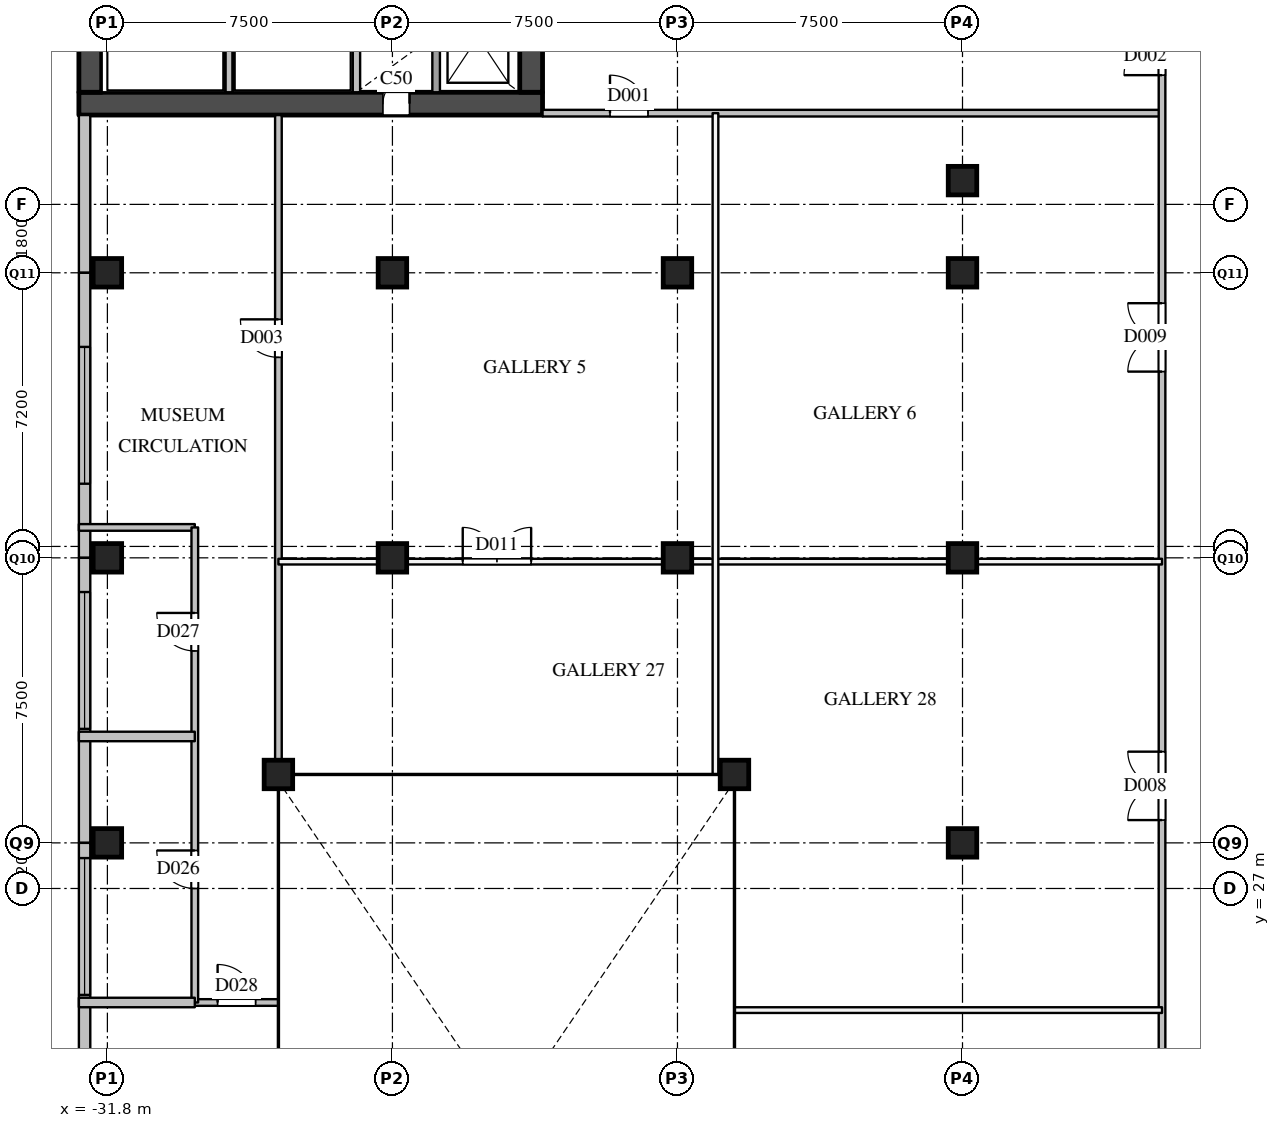
"""IFC4 building model, lengths in metres.
Left out: names, types, materials, properties, quantities, classifications, styles, units other than length and angle.
Written with IfcOpenShell. Run it as: python <this file> out.ifc"""

import sys

from ifc_helpers import new_model, si_unit, direction, frame, frame_2d, origin, origin_2d, place, context, subcontext, project, spatial, rectangle, extrude, element, fill, save


model = new_model("IFC4")
c1 = context("Model", 3, precision=1e-05, world=origin(), true_north=direction((0.0, 1.0)))
c2 = subcontext(c1, "Body", "Model", "MODEL_VIEW")
j1 = project(units=[si_unit("LENGTHUNIT", "METRE"), si_unit("PLANEANGLEUNIT", "RADIAN")], contexts=[c1])
p1 = place(None, origin())
s1 = spatial("IfcSite", under=j1, at=p1, CompositionType="ELEMENT")
p2 = place(p1, origin())
s2 = spatial("IfcBuilding", under=s1, at=p2, CompositionType="ELEMENT")
p3 = place(p2, frame((0.0, 0.0, 21.0)))
s3 = spatial("IfcBuildingStorey", under=s2, at=p3, CompositionType="ELEMENT", Elevation=21.0)
for number, where, z_axis, x_axis in (
    (1, (-31.8, 28.2, 0.0), (0.0, 0.0, 1.0), (1.0, 0.0, 0.0)),
    (2, (-31.8, 35.7, 0.0), (0.0, 0.0, 1.0), (1.0, 0.0, 0.0)),
    (3, (-31.8, 43.2, 0.0), (0.0, 0.0, 1.0), (1.0, 0.0, 0.0)),
    (4, (-24.3, 35.7, 0.0), (0.0, 0.0, 1.0), (1.0, 0.0, 0.0)),
    (5, (-24.3, 43.2, 0.0), (0.0, 0.0, 1.0), (1.0, 0.0, 0.0)),
    (6, (-16.8, 35.7, 0.0), (0.0, 0.0, 1.0), (1.0, 0.0, 0.0)),
    (7, (-16.8, 43.2, 0.0), (0.0, 0.0, 1.0), (1.0, 0.0, 0.0)),
    (8, (-9.3, 28.2, 0.0), (0.0, 0.0, 1.0), (1.0, 0.0, 0.0)),
    (9, (-9.3, 35.7, 0.0), (0.0, 0.0, 1.0), (1.0, 0.0, 0.0)),
    (10, (-9.3, 43.2, 0.0), (0.0, 0.0, 1.0), (1.0, 0.0, 0.0)),
    (11, (-15.3, 30.0, 0.0), (0.0, 0.0, 1.0), (1.0, 0.0, 0.0)),
    (12, (-27.3, 30.0, 0.0), (0.0, 0.0, 1.0), (1.0, 0.0, 0.0)),
    (13, (-9.3, 45.625, 0.0), (0.0, 0.0, 1.0), (1.0, 0.0, 0.0)),
):
    element("IfcColumn", number, at=place(p3, frame(where, z_axis=z_axis, x_axis=x_axis)), inside=s3, PredefinedType="COLUMN", context=c2, shape_type="SweptSolid", body=[
        extrude(rectangle(XDim=0.75, YDim=0.75, at=origin_2d()), origin(), (0.0, 0.0, 1.0), 5.0),
    ])
p4 = place(p3, frame((-32.4, 47.35, 0.0), z_axis=(0.0, 0.0, 1.0), x_axis=(0.0, -1.0, 0.0)))
e14 = element("IfcWall", 14, at=p4, inside=s3, PredefinedType="SOLIDWALL", context=c2, shape_type="SweptSolid", body=[
    extrude(rectangle(XDim=4.15, YDim=0.3, at=frame_2d((2.075, 0.0))), origin(), (0.0, 0.0, 1.0), 4.59),
])
p5 = place(p3, frame((-32.4, 43.2, 0.0), z_axis=(0.0, 0.0, 1.0), x_axis=(0.0, -1.0, 0.0)))
e15 = element("IfcWall", 15, at=p5, inside=s3, PredefinedType="SOLIDWALL", context=c2, shape_type="SweptSolid", body=[
    extrude(rectangle(XDim=7.5, YDim=0.3, at=frame_2d((3.75, 0.0))), origin(), (0.0, 0.0, 1.0), 4.59),
])
p6 = place(p5, frame((1.95, 0.0, 2.4)))
e16 = element("IfcOpeningElement", 16, at=p6, cuts=e15, PredefinedType="OPENING", context=c2, shape_type="SweptSolid", body=[
    extrude(rectangle(XDim=3.6, YDim=1.2, at=frame_2d((1.8, 0.6))), frame((0.0, 0.16, 0.0), z_axis=(0.0, -1.0, 0.0), x_axis=(1.0, 0.0, 0.0)), (0.0, 0.0, 1.0), 0.32),
])
p7 = place(p3, frame((-32.4, 35.7, 0.0), z_axis=(0.0, 0.0, 1.0), x_axis=(0.0, -1.0, 0.0)))
e17 = element("IfcWall", 17, at=p7, inside=s3, PredefinedType="SOLIDWALL", context=c2, shape_type="SweptSolid", body=[
    extrude(rectangle(XDim=7.5, YDim=0.3, at=frame_2d((3.75, 0.0))), origin(), (0.0, 0.0, 1.0), 4.59),
])
p8 = place(p7, frame((0.9, 0.0, 2.4)))
e18 = element("IfcOpeningElement", 18, at=p8, cuts=e17, PredefinedType="OPENING", context=c2, shape_type="SweptSolid", body=[
    extrude(rectangle(XDim=3.6, YDim=1.2, at=frame_2d((1.8, 0.6))), frame((0.0, 0.16, 0.0), z_axis=(0.0, -1.0, 0.0), x_axis=(1.0, 0.0, 0.0)), (0.0, 0.0, 1.0), 0.32),
])
p9 = place(p3, frame((-32.4, 28.2, 0.0), z_axis=(0.0, 0.0, 1.0), x_axis=(0.0, -1.0, 0.0)))
e19 = element("IfcWall", 19, at=p9, inside=s3, PredefinedType="SOLIDWALL", context=c2, shape_type="SweptSolid", body=[
    extrude(rectangle(XDim=7.5, YDim=0.3, at=frame_2d((3.75, 0.0))), origin(), (0.0, 0.0, 1.0), 4.59),
])
p10 = place(p9, frame((0.4, 0.0, 2.4)))
e20 = element("IfcOpeningElement", 20, at=p10, cuts=e19, PredefinedType="OPENING", context=c2, shape_type="SweptSolid", body=[
    extrude(rectangle(XDim=3.6, YDim=1.2, at=frame_2d((1.8, 0.6))), frame((0.0, 0.16, 0.0), z_axis=(0.0, -1.0, 0.0), x_axis=(1.0, 0.0, 0.0)), (0.0, 0.0, 1.0), 0.32),
])
p11 = place(p3, frame((-32.55, 47.65, 0.0), z_axis=(0.0, 0.0, 1.0), x_axis=(1.0, 0.0, 0.0)))
e21 = element("IfcWall", 21, at=p11, inside=s3, PredefinedType="SHEAR", context=c2, shape_type="SweptSolid", body=[
    extrude(rectangle(XDim=12.2, YDim=0.6, at=frame_2d((6.1, 0.0))), origin(), (0.0, 0.0, 1.0), 4.55),
])
p12 = place(p11, frame((8.0, 0.0, 0.0)))
e22 = element("IfcOpeningElement", 22, at=p12, cuts=e21, PredefinedType="OPENING", context=c2, shape_type="SweptSolid", body=[
    extrude(rectangle(XDim=0.7, YDim=2.1, at=frame_2d((0.35, 1.05))), frame((0.0, 0.31, 0.0), z_axis=(0.0, -1.0, 0.0), x_axis=(1.0, 0.0, 0.0)), (0.0, 0.0, 1.0), 0.62),
])
p13 = place(p3, frame((-32.25, 47.95, 0.0), z_axis=(0.0, 0.0, 1.0), x_axis=(0.0, 1.0, 0.0)))
e23 = element("IfcWall", 23, at=p13, inside=s3, PredefinedType="SHEAR", context=c2, shape_type="SweptSolid", body=[
    extrude(rectangle(XDim=10.4, YDim=0.6, at=frame_2d((5.2, 0.0))), origin(), (0.0, 0.0, 1.0), 4.55),
])
p14 = place(p3, frame((-20.65, 47.95, 0.0), z_axis=(0.0, 0.0, 1.0), x_axis=(0.0, 1.0, 0.0)))
e24 = element("IfcWall", 24, at=p14, inside=s3, PredefinedType="SHEAR", context=c2, shape_type="SweptSolid", body=[
    extrude(rectangle(XDim=10.4, YDim=0.6, at=frame_2d((5.2, 0.0))), origin(), (0.0, 0.0, 1.0), 4.55),
])
p15 = place(p14, frame((6.7, 0.0, 0.0)))
e25 = element("IfcOpeningElement", 25, at=p15, cuts=e24, PredefinedType="OPENING", context=c2, shape_type="SweptSolid", body=[
    extrude(rectangle(XDim=1.0, YDim=2.1, at=frame_2d((0.5, 1.05))), frame((0.0, 0.31, 0.0), z_axis=(0.0, -1.0, 0.0), x_axis=(1.0, 0.0, 0.0)), (0.0, 0.0, 1.0), 0.62),
])
for number, where, z_axis, x_axis in (
    (26, (-28.6, 47.95, 0.0), (0.0, 0.0, 1.0), (0.0, 1.0, 0.0)),
    (27, (-25.25, 47.95, 0.0), (0.0, 0.0, 1.0), (0.0, 1.0, 0.0)),
):
    element("IfcWall", number, at=place(p3, frame(where, z_axis=z_axis, x_axis=x_axis)), inside=s3, PredefinedType="SOLIDWALL", context=c2, shape_type="SweptSolid", body=[
        extrude(rectangle(XDim=2.08, YDim=0.2, at=frame_2d((1.04, 0.0))), origin(), (0.0, 0.0, 1.0), 4.55),
    ])
p16 = place(p3, frame((-23.15, 47.95, 0.0), z_axis=(0.0, 0.0, 1.0), x_axis=(0.0, 1.0, 0.0)))
e28 = element("IfcWall", 28, at=p16, inside=s3, PredefinedType="SOLIDWALL", context=c2, shape_type="SweptSolid", body=[
    extrude(rectangle(XDim=2.9, YDim=0.2, at=frame_2d((1.45, 0.0))), origin(), (0.0, 0.0, 1.0), 4.55),
])
p17 = place(p3, frame((-29.5, 24.0, 0.0), z_axis=(0.0, 0.0, 1.0), x_axis=(1.0, 0.0, 0.0)))
e29 = element("IfcWall", 29, at=p17, inside=s3, PredefinedType="PARTITIONING", context=c2, shape_type="SweptSolid", body=[
    extrude(rectangle(XDim=2.2, YDim=0.175, at=frame_2d((1.1, 0.0))), origin(), (0.0, 0.0, 1.0), 4.55),
])
p18 = place(p17, frame((0.6, 0.0, 0.0)))
e30 = element("IfcOpeningElement", 30, at=p18, cuts=e29, PredefinedType="OPENING", context=c2, shape_type="SweptSolid", body=[
    extrude(rectangle(XDim=1.0, YDim=2.1, at=frame_2d((0.5, 1.05))), frame((0.0, 0.097, 0.0), z_axis=(0.0, -1.0, 0.0), x_axis=(1.0, 0.0, 0.0)), (0.0, 0.0, 1.0), 0.195),
])
p19 = place(p3, frame((-32.55, 36.5, 0.0), z_axis=(0.0, 0.0, 1.0), x_axis=(1.0, 0.0, 0.0)))
e31 = element("IfcWall", 31, at=p19, inside=s3, PredefinedType="PARTITIONING", context=c2, shape_type="SweptSolid", body=[
    extrude(rectangle(XDim=3.05, YDim=0.175, at=frame_2d((1.525, 0.0))), origin(), (0.0, 0.0, 1.0), 3.79),
])
p20 = place(p3, frame((-20.35, 47.4, 0.0), z_axis=(0.0, 0.0, 1.0), x_axis=(1.0, 0.0, 0.0)))
e32 = element("IfcWall", 32, at=p20, inside=s3, PredefinedType="PARTITIONING", context=c2, shape_type="SweptSolid", body=[
    extrude(rectangle(XDim=16.3, YDim=0.175, at=frame_2d((8.15, 0.0))), origin(), (0.0, 0.0, 1.0), 3.79),
])
p21 = place(p20, frame((1.775, 0.0, 0.0)))
e33 = element("IfcOpeningElement", 33, at=p21, cuts=e32, PredefinedType="OPENING", context=c2, shape_type="SweptSolid", body=[
    extrude(rectangle(XDim=1.0, YDim=2.1, at=frame_2d((0.5, 1.05))), frame((0.0, 0.097, 0.0), z_axis=(0.0, -1.0, 0.0), x_axis=(1.0, 0.0, 0.0)), (0.0, 0.0, 1.0), 0.195),
])
p22 = place(p3, frame((-29.5, 24.0, 0.0), z_axis=(0.0, 0.0, 1.0), x_axis=(0.0, 1.0, 0.0)))
e34 = element("IfcWall", 34, at=p22, inside=s3, PredefinedType="PARTITIONING", context=c2, shape_type="SweptSolid", body=[
    extrude(rectangle(XDim=12.5, YDim=0.175, at=frame_2d((6.25, 0.0))), origin(), (0.0, 0.0, 1.0), 3.79),
])
p23 = place(p22, frame((3.0, 0.0, 0.0)))
e35 = element("IfcOpeningElement", 35, at=p23, cuts=e34, PredefinedType="OPENING", context=c2, shape_type="SweptSolid", body=[
    extrude(rectangle(XDim=1.0, YDim=2.1, at=frame_2d((0.5, 1.05))), frame((0.0, 0.097, 0.0), z_axis=(0.0, -1.0, 0.0), x_axis=(1.0, 0.0, 0.0)), (0.0, 0.0, 1.0), 0.195),
])
p24 = place(p22, frame((9.25, 0.0, 0.0)))
e36 = element("IfcOpeningElement", 36, at=p24, cuts=e34, PredefinedType="OPENING", context=c2, shape_type="SweptSolid", body=[
    extrude(rectangle(XDim=1.0, YDim=2.1, at=frame_2d((0.5, 1.05))), frame((0.0, 0.097, 0.0), z_axis=(0.0, -1.0, 0.0), x_axis=(1.0, 0.0, 0.0)), (0.0, 0.0, 1.0), 0.195),
])
p25 = place(p3, frame((-27.3, 30.0, 0.0), z_axis=(0.0, 0.0, 1.0), x_axis=(0.0, 1.0, 0.0)))
e37 = element("IfcWall", 37, at=p25, inside=s3, PredefinedType="PARTITIONING", context=c2, shape_type="SweptSolid", body=[
    extrude(rectangle(XDim=17.35, YDim=0.175, at=frame_2d((8.675, 0.0))), origin(), (0.0, 0.0, 1.0), 3.79),
])
p26 = place(p25, frame((10.975, 0.0, 0.0)))
e38 = element("IfcOpeningElement", 38, at=p26, cuts=e37, PredefinedType="OPENING", context=c2, shape_type="SweptSolid", body=[
    extrude(rectangle(XDim=1.0, YDim=2.1, at=frame_2d((0.5, 1.05))), frame((0.0, 0.097, 0.0), z_axis=(0.0, -1.0, 0.0), x_axis=(1.0, 0.0, 0.0)), (0.0, 0.0, 1.0), 0.195),
])
p27 = place(p3, frame((-4.05, -4.05, 0.0), z_axis=(0.0, 0.0, 1.0), x_axis=(0.0, 1.0, 0.0)))
e39 = element("IfcWall", 39, at=p27, inside=s3, PredefinedType="PARTITIONING", context=c2, shape_type="SweptSolid", body=[
    extrude(rectangle(XDim=63.0, YDim=0.175, at=frame_2d((31.5, 0.0))), origin(), (0.0, 0.0, 1.0), 3.79),
])
p28 = place(p27, frame((52.45, 0.0, 0.0)))
e40 = element("IfcOpeningElement", 40, at=p28, cuts=e39, PredefinedType="OPENING", context=c2, shape_type="SweptSolid", body=[
    extrude(rectangle(XDim=1.0, YDim=2.1, at=frame_2d((0.5, 1.05))), frame((0.0, 0.097, 0.0), z_axis=(0.0, -1.0, 0.0), x_axis=(1.0, 0.0, 0.0)), (0.0, 0.0, 1.0), 0.195),
])
p29 = place(p27, frame((7.525, 0.0, 0.0)))
e41 = element("IfcOpeningElement", 41, at=p29, cuts=e39, PredefinedType="OPENING", context=c2, shape_type="SweptSolid", body=[
    extrude(rectangle(XDim=1.0, YDim=2.1, at=frame_2d((0.5, 1.05))), frame((0.0, 0.097, 0.0), z_axis=(0.0, -1.0, 0.0), x_axis=(1.0, 0.0, 0.0)), (0.0, 0.0, 1.0), 0.195),
])
p30 = place(p27, frame((21.05, 0.0, 0.0)))
e42 = element("IfcOpeningElement", 42, at=p30, cuts=e39, PredefinedType="OPENING", context=c2, shape_type="SweptSolid", body=[
    extrude(rectangle(XDim=1.8, YDim=2.1, at=frame_2d((0.9, 1.05))), frame((0.0, 0.097, 0.0), z_axis=(0.0, -1.0, 0.0), x_axis=(1.0, 0.0, 0.0)), (0.0, 0.0, 1.0), 0.195),
])
p31 = place(p27, frame((32.85, 0.0, 0.0)))
e43 = element("IfcOpeningElement", 43, at=p31, cuts=e39, PredefinedType="OPENING", context=c2, shape_type="SweptSolid", body=[
    extrude(rectangle(XDim=1.8, YDim=2.1, at=frame_2d((0.9, 1.05))), frame((0.0, 0.097, 0.0), z_axis=(0.0, -1.0, 0.0), x_axis=(1.0, 0.0, 0.0)), (0.0, 0.0, 1.0), 0.195),
])
p32 = place(p27, frame((44.65, 0.0, 0.0)))
e44 = element("IfcOpeningElement", 44, at=p32, cuts=e39, PredefinedType="OPENING", context=c2, shape_type="SweptSolid", body=[
    extrude(rectangle(XDim=1.8, YDim=2.1, at=frame_2d((0.9, 1.05))), frame((0.0, 0.097, 0.0), z_axis=(0.0, -1.0, 0.0), x_axis=(1.0, 0.0, 0.0)), (0.0, 0.0, 1.0), 0.195),
])
p33 = place(p3, frame((-15.3, 23.8, 0.0), z_axis=(0.0, 0.0, 1.0), x_axis=(1.0, 0.0, 0.0)))
e45 = element("IfcWall", 45, at=p33, inside=s3, PredefinedType="PARTITIONING", context=c2, shape_type="SweptSolid", body=[
    extrude(rectangle(XDim=11.25, YDim=0.15, at=frame_2d((5.625, 0.0))), origin(), (0.0, 0.0, 1.0), 3.79),
])
p34 = place(p3, frame((-27.3, 35.6, 0.0), z_axis=(0.0, 0.0, 1.0), x_axis=(1.0, 0.0, 0.0)))
e46 = element("IfcWall", 46, at=p34, inside=s3, PredefinedType="PARTITIONING", context=c2, shape_type="SweptSolid", body=[
    extrude(rectangle(XDim=23.25, YDim=0.15, at=frame_2d((11.625, 0.0))), origin(), (0.0, 0.0, 1.0), 3.79),
])
p35 = place(p34, frame((4.85, 0.0, 0.0)))
e47 = element("IfcOpeningElement", 47, at=p35, cuts=e46, PredefinedType="OPENING", context=c2, shape_type="SweptSolid", body=[
    extrude(rectangle(XDim=1.8, YDim=2.1, at=frame_2d((0.9, 1.05))), frame((0.0, 0.085, 0.0), z_axis=(0.0, -1.0, 0.0), x_axis=(1.0, 0.0, 0.0)), (0.0, 0.0, 1.0), 0.17),
])
p36 = place(p3, frame((-15.8, 30.0, 0.0), z_axis=(0.0, 0.0, 1.0), x_axis=(0.0, 1.0, 0.0)))
e48 = element("IfcWall", 48, at=p36, inside=s3, PredefinedType="PARTITIONING", context=c2, shape_type="SweptSolid", body=[
    extrude(rectangle(XDim=17.4, YDim=0.15, at=frame_2d((8.7, 0.0))), origin(), (0.0, 0.0, 1.0), 3.79),
])
for number, where, z_axis, x_axis in (
    (49, (-32.55, 24.0, 0.0), (0.0, 0.0, 1.0), (1.0, 0.0, 0.0)),
    (50, (-32.55, 31.0, 0.0), (0.0, 0.0, 1.0), (1.0, 0.0, 0.0)),
):
    element("IfcWall", number, at=place(p3, frame(where, z_axis=z_axis, x_axis=x_axis)), inside=s3, PredefinedType="PARTITIONING", context=c2, shape_type="SweptSolid", body=[
        extrude(rectangle(XDim=3.05, YDim=0.25, at=frame_2d((1.525, 0.0))), origin(), (0.0, 0.0, 1.0), 3.79),
    ])
p37 = place(p6, origin())
e51 = element("IfcWindow", 51, at=p37, inside=s3, PartitioningType="SINGLE_PANEL", PredefinedType="WINDOW", context=c2, shape_type="SweptSolid", body=[
    extrude(rectangle(XDim=3.6, YDim=1.2, at=frame_2d((1.8, 0.6))), frame((0.0, 0.03, 0.0), z_axis=(0.0, -1.0, 0.0), x_axis=(1.0, 0.0, 0.0)), (0.0, 0.0, 1.0), 0.06),
])
fill(e16, e51)
p38 = place(p8, origin())
e52 = element("IfcWindow", 52, at=p38, inside=s3, PartitioningType="SINGLE_PANEL", PredefinedType="WINDOW", context=c2, shape_type="SweptSolid", body=[
    extrude(rectangle(XDim=3.6, YDim=1.2, at=frame_2d((1.8, 0.6))), frame((0.0, 0.03, 0.0), z_axis=(0.0, -1.0, 0.0), x_axis=(1.0, 0.0, 0.0)), (0.0, 0.0, 1.0), 0.06),
])
fill(e18, e52)
p39 = place(p10, origin())
e53 = element("IfcWindow", 53, at=p39, inside=s3, PartitioningType="SINGLE_PANEL", PredefinedType="WINDOW", context=c2, shape_type="SweptSolid", body=[
    extrude(rectangle(XDim=3.6, YDim=1.2, at=frame_2d((1.8, 0.6))), frame((0.0, 0.03, 0.0), z_axis=(0.0, -1.0, 0.0), x_axis=(1.0, 0.0, 0.0)), (0.0, 0.0, 1.0), 0.06),
])
fill(e20, e53)
p40 = place(p12, origin())
e54 = element("IfcDoor", 54, at=p40, inside=s3, OperationType="SINGLE_SWING_RIGHT", PredefinedType="DOOR", context=c2, shape_type="SweptSolid", body=[
    extrude(rectangle(XDim=0.7, YDim=2.1, at=frame_2d((0.35, 1.05))), frame((0.0, 0.025, 0.0), z_axis=(0.0, -1.0, 0.0), x_axis=(1.0, 0.0, 0.0)), (0.0, 0.0, 1.0), 0.05),
])
fill(e22, e54)
p41 = place(p21, origin())
e55 = element("IfcDoor", 55, at=p41, inside=s3, OperationType="SINGLE_SWING_LEFT", PredefinedType="DOOR", context=c2, shape_type="SweptSolid", body=[
    extrude(rectangle(XDim=1.0, YDim=2.1, at=frame_2d((0.5, 1.05))), frame((0.0, 0.025, 0.0), z_axis=(0.0, -1.0, 0.0), x_axis=(1.0, 0.0, 0.0)), (0.0, 0.0, 1.0), 0.05),
])
fill(e33, e55)
p42 = place(p28, origin())
e56 = element("IfcDoor", 56, at=p42, inside=s3, OperationType="SINGLE_SWING_LEFT", PredefinedType="DOOR", context=c2, shape_type="SweptSolid", body=[
    extrude(rectangle(XDim=1.0, YDim=2.1, at=frame_2d((0.5, 1.05))), frame((0.0, 0.025, 0.0), z_axis=(0.0, -1.0, 0.0), x_axis=(1.0, 0.0, 0.0)), (0.0, 0.0, 1.0), 0.05),
])
fill(e40, e56)
p43 = place(p26, origin())
e57 = element("IfcDoor", 57, at=p43, inside=s3, OperationType="SINGLE_SWING_RIGHT", PredefinedType="DOOR", context=c2, shape_type="SweptSolid", body=[
    extrude(rectangle(XDim=1.0, YDim=2.1, at=frame_2d((0.5, 1.05))), frame((0.0, 0.025, 0.0), z_axis=(0.0, -1.0, 0.0), x_axis=(1.0, 0.0, 0.0)), (0.0, 0.0, 1.0), 0.05),
])
fill(e38, e57)
p44 = place(p31, origin())
e58 = element("IfcDoor", 58, at=p44, inside=s3, OperationType="DOUBLE_DOOR_SINGLE_SWING", PredefinedType="DOOR", context=c2, shape_type="SweptSolid", body=[
    extrude(rectangle(XDim=1.8, YDim=2.1, at=frame_2d((0.9, 1.05))), frame((0.0, 0.025, 0.0), z_axis=(0.0, -1.0, 0.0), x_axis=(1.0, 0.0, 0.0)), (0.0, 0.0, 1.0), 0.05),
])
fill(e43, e58)
p45 = place(p32, origin())
e59 = element("IfcDoor", 59, at=p45, inside=s3, OperationType="DOUBLE_DOOR_SINGLE_SWING", PredefinedType="DOOR", context=c2, shape_type="SweptSolid", body=[
    extrude(rectangle(XDim=1.8, YDim=2.1, at=frame_2d((0.9, 1.05))), frame((0.0, 0.025, 0.0), z_axis=(0.0, -1.0, 0.0), x_axis=(1.0, 0.0, 0.0)), (0.0, 0.0, 1.0), 0.05),
])
fill(e44, e59)
p46 = place(p35, origin())
e60 = element("IfcDoor", 60, at=p46, inside=s3, OperationType="DOUBLE_DOOR_SINGLE_SWING", PredefinedType="DOOR", context=c2, shape_type="SweptSolid", body=[
    extrude(rectangle(XDim=1.8, YDim=2.1, at=frame_2d((0.9, 1.05))), frame((0.0, 0.025, 0.0), z_axis=(0.0, -1.0, 0.0), x_axis=(1.0, 0.0, 0.0)), (0.0, 0.0, 1.0), 0.05),
])
fill(e47, e60)
p47 = place(p23, origin())
e61 = element("IfcDoor", 61, at=p47, inside=s3, OperationType="SINGLE_SWING_RIGHT", PredefinedType="DOOR", context=c2, shape_type="SweptSolid", body=[
    extrude(rectangle(XDim=1.0, YDim=2.1, at=frame_2d((0.5, 1.05))), frame((0.0, 0.025, 0.0), z_axis=(0.0, -1.0, 0.0), x_axis=(1.0, 0.0, 0.0)), (0.0, 0.0, 1.0), 0.05),
])
fill(e35, e61)
p48 = place(p24, origin())
e62 = element("IfcDoor", 62, at=p48, inside=s3, OperationType="SINGLE_SWING_RIGHT", PredefinedType="DOOR", context=c2, shape_type="SweptSolid", body=[
    extrude(rectangle(XDim=1.0, YDim=2.1, at=frame_2d((0.5, 1.05))), frame((0.0, 0.025, 0.0), z_axis=(0.0, -1.0, 0.0), x_axis=(1.0, 0.0, 0.0)), (0.0, 0.0, 1.0), 0.05),
])
fill(e36, e62)
p49 = place(p18, origin())
e63 = element("IfcDoor", 63, at=p49, inside=s3, OperationType="SINGLE_SWING_LEFT", PredefinedType="DOOR", context=c2, shape_type="SweptSolid", body=[
    extrude(rectangle(XDim=1.0, YDim=2.1, at=frame_2d((0.5, 1.05))), frame((0.0, 0.025, 0.0), z_axis=(0.0, -1.0, 0.0), x_axis=(1.0, 0.0, 0.0)), (0.0, 0.0, 1.0), 0.05),
])
fill(e30, e63)
save(model, sys.argv[1])
